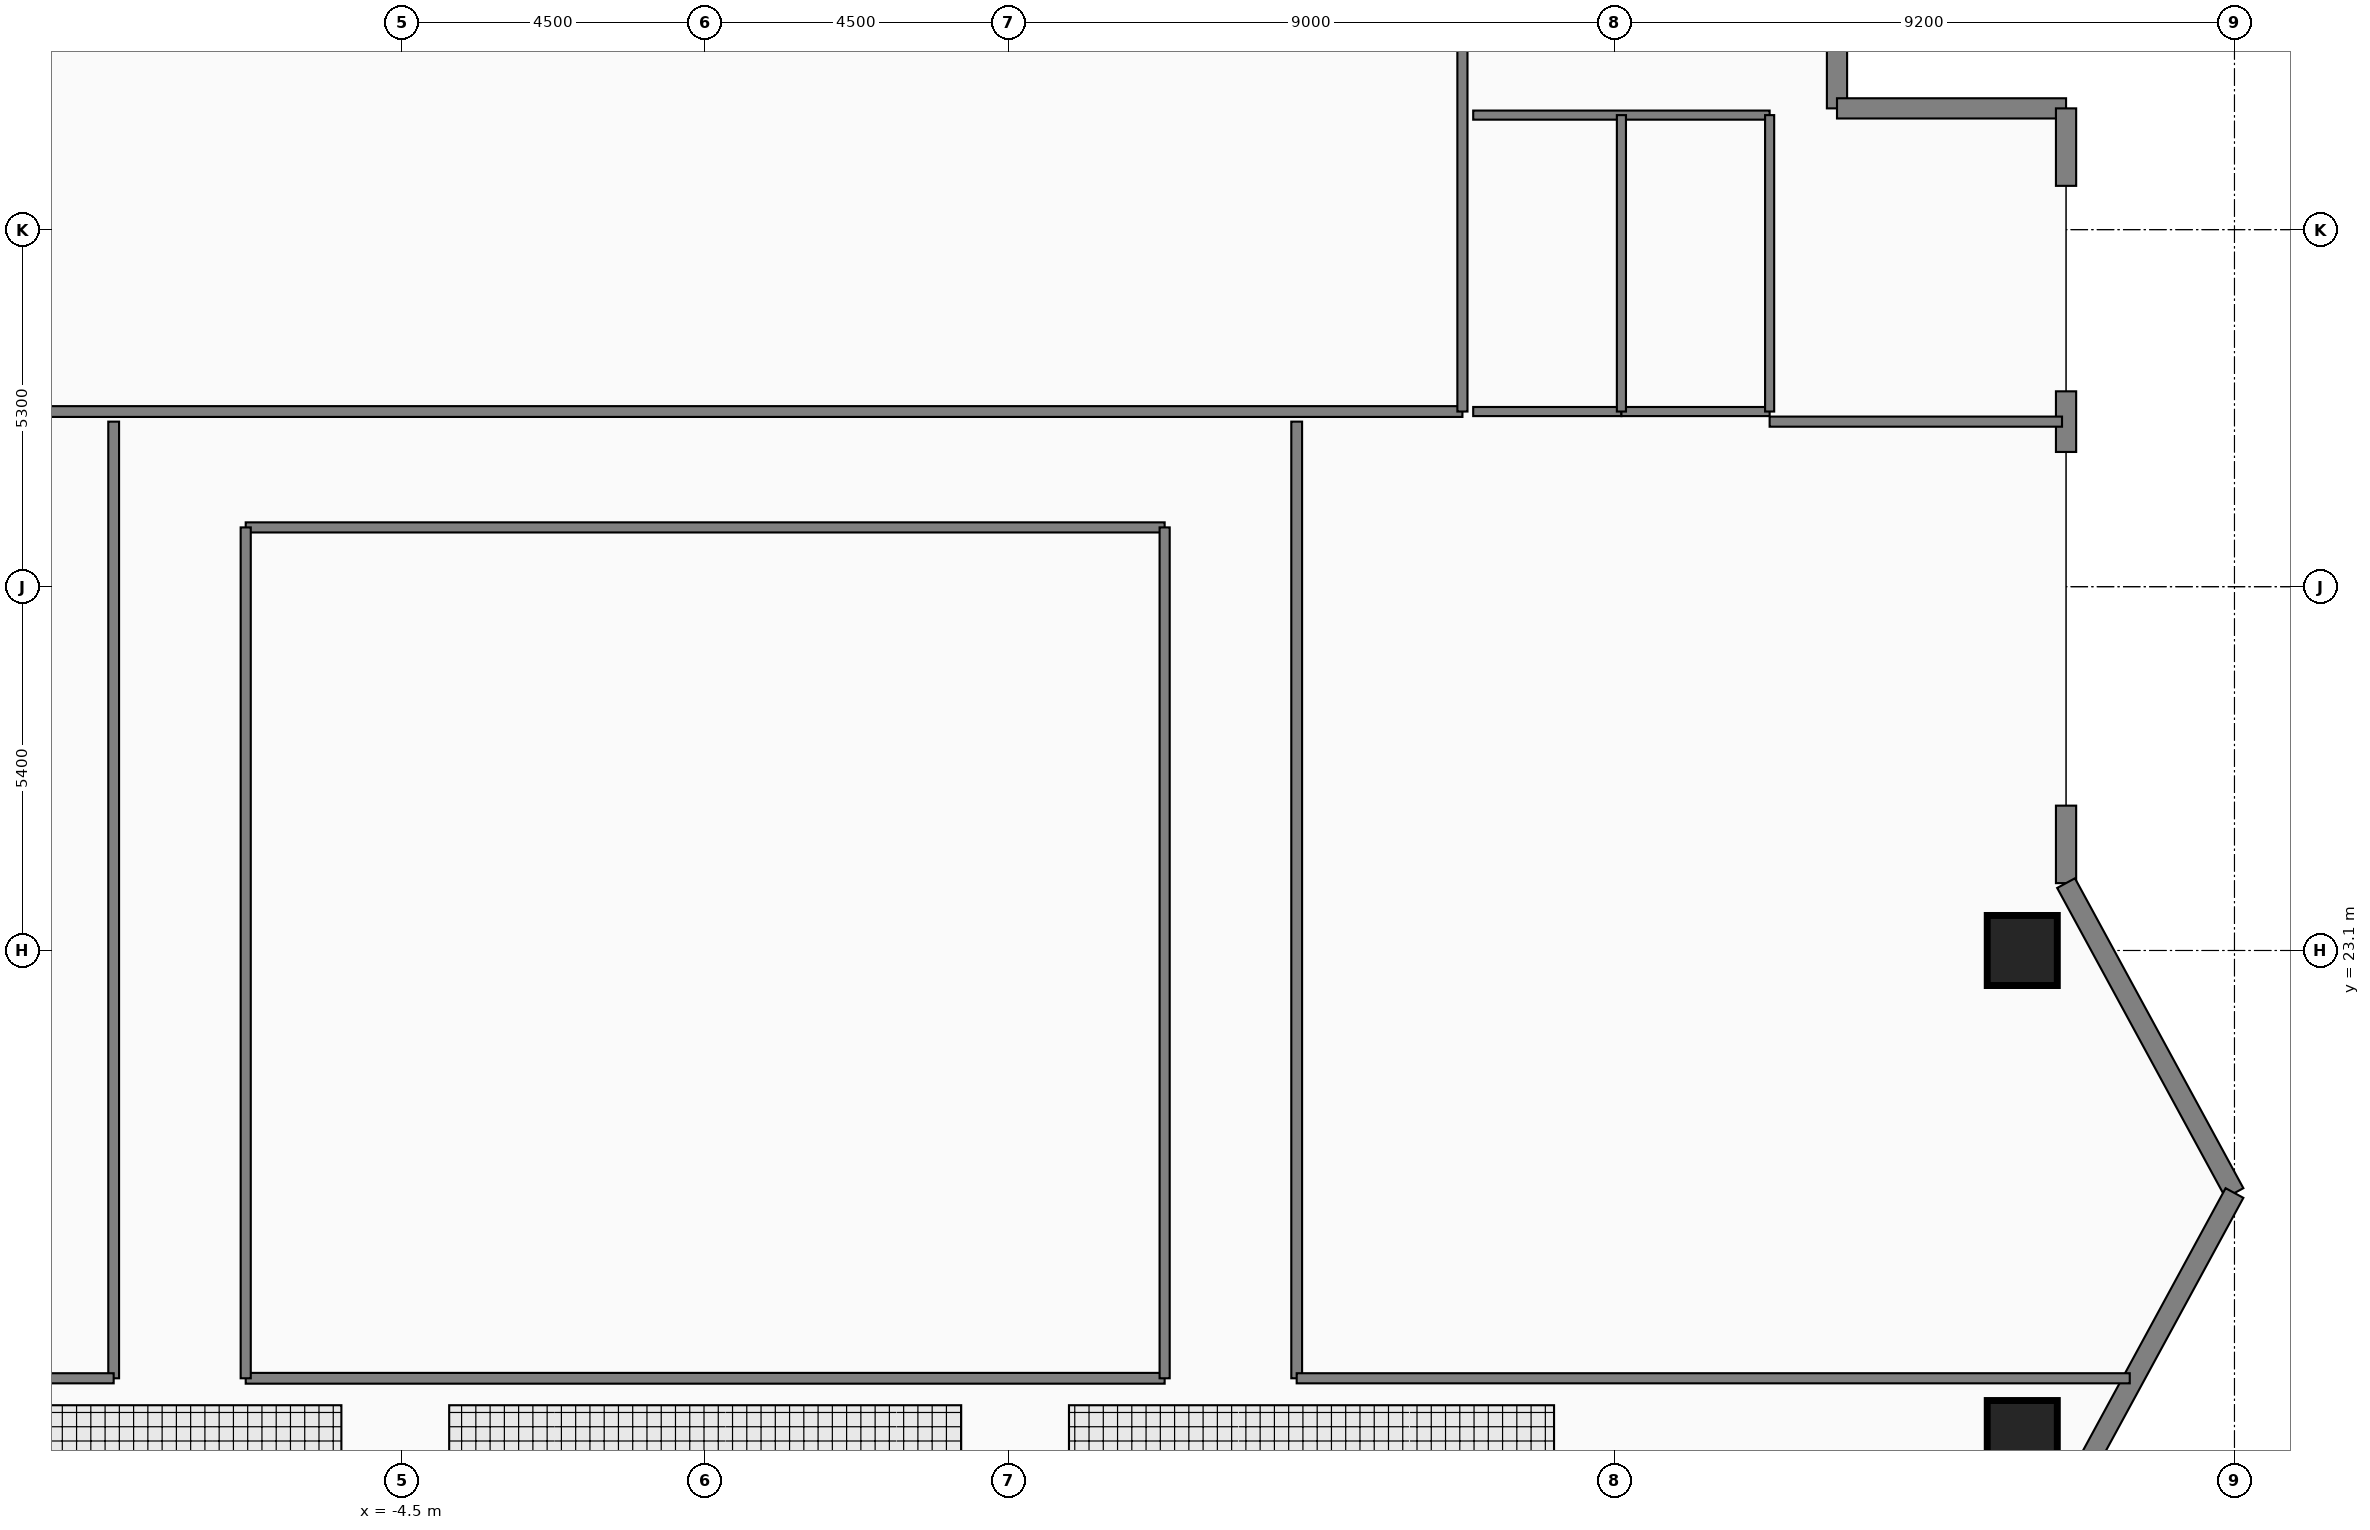
"""IFC4 building model, lengths in metres.
Left out: names, types, materials, properties, quantities, classifications, styles, units other than length and angle.
Written with IfcOpenShell. Run it as: python <this file> out.ifc"""

import sys

from ifc_helpers import new_model, si_unit, direction, frame, frame_2d, origin, origin_2d, place, context, subcontext, project, spatial, rectangle, extrude, element, fill, save


model = new_model("IFC4")
c1 = context("Model", 3, precision=1e-05, world=origin(), true_north=direction((0.0, 1.0)))
c2 = subcontext(c1, "Body", "Model", "MODEL_VIEW")
j1 = project(units=[si_unit("LENGTHUNIT", "METRE"), si_unit("PLANEANGLEUNIT", "RADIAN")], contexts=[c1])
p1 = place(None, origin())
s1 = spatial("IfcSite", under=j1, at=p1, CompositionType="ELEMENT")
p2 = place(p1, origin())
s2 = spatial("IfcBuilding", under=s1, at=p2, CompositionType="ELEMENT")
p3 = place(p2, frame((0.0, 0.0, 284.05)))
s3 = spatial("IfcBuildingStorey", under=s2, at=p3, CompositionType="ELEMENT", Elevation=284.05)
for number, where, z_axis, x_axis in (
    (1, (19.55, 15.9, 0.0), (0.0, 0.0, 1.0), (1.0, 0.0, 0.0)),
    (2, (19.55, 23.1, 0.0), (0.0, 0.0, 1.0), (1.0, 0.0, 0.0)),
):
    element("IfcColumn", number, at=place(p3, frame(where, z_axis=z_axis, x_axis=x_axis)), inside=s3, PredefinedType="COLUMN", context=c2, shape_type="SweptSolid", body=[
        extrude(rectangle(XDim=1.0, YDim=1.0, at=origin_2d()), origin(), (0.0, 0.0, 1.0), 4.4),
    ])
p4 = place(p3, frame((16.8, 39.0, 0.0), z_axis=(0.0, 0.0, 1.0), x_axis=(0.0, -1.0, 0.0)))
e3 = element("IfcWall", 3, at=p4, inside=s3, PredefinedType="STANDARD", context=c2, shape_type="SweptSolid", body=[
    extrude(rectangle(XDim=3.4, YDim=0.3, at=frame_2d((1.7, 0.0))), origin(), (0.0, 0.0, 1.0), 4.18),
])
p5 = place(p4, frame((1.125, 0.0, 1.25)))
e4 = element("IfcOpeningElement", 4, at=p5, cuts=e3, PredefinedType="OPENING", context=c2, shape_type="SweptSolid", body=[
    extrude(rectangle(XDim=1.15, YDim=1.55, at=frame_2d((0.575, 0.775))), frame((0.0, 0.16, 0.0), z_axis=(0.0, -1.0, 0.0), x_axis=(1.0, 0.0, 0.0)), (0.0, 0.0, 1.0), 0.32),
])
p6 = place(p3, frame((16.8, 35.6, 0.0), z_axis=(0.0, 0.0, 1.0), x_axis=(1.0, 0.0, 0.0)))
e5 = element("IfcWall", 5, at=p6, inside=s3, PredefinedType="STANDARD", context=c2, shape_type="SweptSolid", body=[
    extrude(rectangle(XDim=3.4, YDim=0.3, at=frame_2d((1.7, 0.0))), origin(), (0.0, 0.0, 1.0), 4.18),
])
p7 = place(p6, frame((1.125, 0.0, 1.25)))
e6 = element("IfcOpeningElement", 6, at=p7, cuts=e5, PredefinedType="OPENING", context=c2, shape_type="SweptSolid", body=[
    extrude(rectangle(XDim=1.15, YDim=1.55, at=frame_2d((0.575, 0.775))), frame((0.0, 0.16, 0.0), z_axis=(0.0, -1.0, 0.0), x_axis=(1.0, 0.0, 0.0)), (0.0, 0.0, 1.0), 0.32),
])
p8 = place(p3, frame((20.2, 35.6, 0.0), z_axis=(0.0, 0.0, 1.0), x_axis=(0.0, -1.0, 0.0)))
e7 = element("IfcWall", 7, at=p8, inside=s3, PredefinedType="STANDARD", context=c2, shape_type="SweptSolid", body=[
    extrude(rectangle(XDim=1.15, YDim=0.3, at=frame_2d((0.575, 0.0))), origin(), (0.0, 0.0, 1.0), 4.18),
])
p9 = place(p3, frame((20.2, 31.4, 0.0), z_axis=(0.0, 0.0, 1.0), x_axis=(0.0, -1.0, 0.0)))
e8 = element("IfcWall", 8, at=p9, inside=s3, PredefinedType="STANDARD", context=c2, shape_type="SweptSolid", body=[
    extrude(rectangle(XDim=0.9, YDim=0.3, at=frame_2d((0.45, 0.0))), origin(), (0.0, 0.0, 1.0), 4.18),
])
p10 = place(p3, frame((20.2, 25.25, 0.0), z_axis=(0.0, 0.0, 1.0), x_axis=(0.0, -1.0, 0.0)))
e9 = element("IfcWall", 9, at=p10, inside=s3, PredefinedType="STANDARD", context=c2, shape_type="SweptSolid", body=[
    extrude(rectangle(XDim=1.15, YDim=0.3, at=frame_2d((0.575, 0.0))), origin(), (0.0, 0.0, 1.0), 4.18),
])
p11 = place(p3, frame((20.2, 24.1, 0.0), z_axis=(0.0, 0.0, 1.0), x_axis=(0.477505494629, -0.878628762675, 0.0)))
e10 = element("IfcWall", 10, at=p11, inside=s3, PredefinedType="STANDARD", context=c2, shape_type="SweptSolid", body=[
    extrude(rectangle(XDim=5.236, YDim=0.3, at=frame_2d((2.618, 0.0))), origin(), (0.0, 0.0, 1.0), 4.18),
])
p12 = place(p11, frame((2.043, 0.0, 1.25)))
e11 = element("IfcOpeningElement", 11, at=p12, cuts=e10, PredefinedType="OPENING", context=c2, shape_type="SweptSolid", body=[
    extrude(rectangle(XDim=1.15, YDim=1.55, at=frame_2d((0.575, 0.775))), frame((0.0, 0.16, 0.0), z_axis=(0.0, -1.0, 0.0), x_axis=(1.0, 0.0, 0.0)), (0.0, 0.0, 1.0), 0.32),
])
p13 = place(p3, frame((22.7, 19.5, 0.0), z_axis=(0.0, 0.0, 1.0), x_axis=(-0.477505494629, -0.878628762675, 0.0)))
e12 = element("IfcWall", 12, at=p13, inside=s3, PredefinedType="STANDARD", context=c2, shape_type="SweptSolid", body=[
    extrude(rectangle(XDim=5.236, YDim=0.3, at=frame_2d((2.618, 0.0))), origin(), (0.0, 0.0, 1.0), 4.18),
])
p14 = place(p13, frame((0.994, 0.0, 1.25)))
e13 = element("IfcOpeningElement", 13, at=p14, cuts=e12, PredefinedType="OPENING", context=c2, shape_type="SweptSolid", body=[
    extrude(rectangle(XDim=1.15, YDim=1.55, at=frame_2d((0.575, 0.775))), frame((0.0, 0.16, 0.0), z_axis=(0.0, -1.0, 0.0), x_axis=(1.0, 0.0, 0.0)), (0.0, 0.0, 1.0), 0.32),
])
p15 = place(p3, frame((-20.14, 31.1, 0.0), z_axis=(0.0, 0.0, 1.0), x_axis=(1.0, 0.0, 0.0)))
e14 = element("IfcWall", 14, at=p15, inside=s3, PredefinedType="PARTITIONING", context=c2, shape_type="SweptSolid", body=[
    extrude(rectangle(XDim=31.38, YDim=0.16, at=frame_2d((15.69, 0.0))), origin(), (0.0, 0.0, 1.0), 4.18),
])
p16 = place(p15, frame((17.35, 0.0, 0.0)))
e15 = element("IfcOpeningElement", 15, at=p16, cuts=e14, PredefinedType="OPENING", context=c2, shape_type="SweptSolid", body=[
    extrude(rectangle(XDim=1.08, YDim=2.18, at=frame_2d((0.54, 1.09))), frame((0.0, 0.09, 0.0), z_axis=(0.0, -1.0, 0.0), x_axis=(1.0, 0.0, 0.0)), (0.0, 0.0, 1.0), 0.18),
])
p17 = place(p3, frame((-6.82, 16.75, 0.0), z_axis=(0.0, 0.0, 1.0), x_axis=(1.0, 0.0, 0.0)))
e16 = element("IfcWall", 16, at=p17, inside=s3, PredefinedType="PARTITIONING", context=c2, shape_type="SweptSolid", body=[
    extrude(rectangle(XDim=13.64, YDim=0.16, at=frame_2d((6.82, 0.0))), origin(), (0.0, 0.0, 1.0), 3.776),
])
p18 = place(p17, frame((8.63, 0.0, 0.0)))
e17 = element("IfcOpeningElement", 17, at=p18, cuts=e16, PredefinedType="OPENING", context=c2, shape_type="SweptSolid", body=[
    extrude(rectangle(XDim=1.08, YDim=2.18, at=frame_2d((0.54, 1.09))), frame((0.0, 0.09, 0.0), z_axis=(0.0, -1.0, 0.0), x_axis=(1.0, 0.0, 0.0)), (0.0, 0.0, 1.0), 0.18),
])
p19 = place(p3, frame((-8.78, 16.75, 0.0), z_axis=(0.0, 0.0, 1.0), x_axis=(0.0, 1.0, 0.0)))
e18 = element("IfcWall", 18, at=p19, inside=s3, PredefinedType="PARTITIONING", context=c2, shape_type="SweptSolid", body=[
    extrude(rectangle(XDim=14.2, YDim=0.16, at=frame_2d((7.1, 0.0))), origin(), (0.0, 0.0, 1.0), 4.18),
])
p20 = place(p19, frame((6.56, 0.0, 0.0)))
e19 = element("IfcOpeningElement", 19, at=p20, cuts=e18, PredefinedType="OPENING", context=c2, shape_type="SweptSolid", body=[
    extrude(rectangle(XDim=1.08, YDim=2.18, at=frame_2d((0.54, 1.09))), frame((0.0, 0.09, 0.0), z_axis=(0.0, -1.0, 0.0), x_axis=(1.0, 0.0, 0.0)), (0.0, 0.0, 1.0), 0.18),
])
p21 = place(p3, frame((8.78, 16.75, 0.0), z_axis=(0.0, 0.0, 1.0), x_axis=(0.0, 1.0, 0.0)))
e20 = element("IfcWall", 20, at=p21, inside=s3, PredefinedType="PARTITIONING", context=c2, shape_type="SweptSolid", body=[
    extrude(rectangle(XDim=14.2, YDim=0.16, at=frame_2d((7.1, 0.0))), origin(), (0.0, 0.0, 1.0), 4.18),
])
p22 = place(p21, frame((6.56, 0.0, 0.0)))
e21 = element("IfcOpeningElement", 21, at=p22, cuts=e20, PredefinedType="OPENING", context=c2, shape_type="SweptSolid", body=[
    extrude(rectangle(XDim=1.08, YDim=2.18, at=frame_2d((0.54, 1.09))), frame((0.0, 0.09, 0.0), z_axis=(0.0, -1.0, 0.0), x_axis=(1.0, 0.0, 0.0)), (0.0, 0.0, 1.0), 0.18),
])
p23 = place(p3, frame((11.4, 31.1, 0.0), z_axis=(0.0, 0.0, 1.0), x_axis=(1.0, 0.0, 0.0)))
e22 = element("IfcWall", 22, at=p23, inside=s3, PredefinedType="PLUMBINGWALL", context=c2, shape_type="SweptSolid", body=[
    extrude(rectangle(XDim=2.2, YDim=0.135, at=frame_2d((1.1, 0.0))), origin(), (0.0, 0.0, 1.0), 4.18),
])
p24 = place(p23, frame((0.64, 0.0, 0.0)))
e23 = element("IfcOpeningElement", 23, at=p24, cuts=e22, PredefinedType="OPENING", context=c2, shape_type="SweptSolid", body=[
    extrude(rectangle(XDim=0.92, YDim=2.12, at=frame_2d((0.46, 1.06))), frame((0.0, 0.077, 0.0), z_axis=(0.0, -1.0, 0.0), x_axis=(1.0, 0.0, 0.0)), (0.0, 0.0, 1.0), 0.155),
])
p25 = place(p3, frame((13.6, 31.1, 0.0), z_axis=(0.0, 0.0, 1.0), x_axis=(1.0, 0.0, 0.0)))
e24 = element("IfcWall", 24, at=p25, inside=s3, PredefinedType="PLUMBINGWALL", context=c2, shape_type="SweptSolid", body=[
    extrude(rectangle(XDim=2.2, YDim=0.135, at=frame_2d((1.1, 0.0))), origin(), (0.0, 0.0, 1.0), 4.18),
])
p26 = place(p25, frame((0.64, 0.0, 0.0)))
e25 = element("IfcOpeningElement", 25, at=p26, cuts=e24, PredefinedType="OPENING", context=c2, shape_type="SweptSolid", body=[
    extrude(rectangle(XDim=0.92, YDim=2.12, at=frame_2d((0.46, 1.06))), frame((0.0, 0.077, 0.0), z_axis=(0.0, -1.0, 0.0), x_axis=(1.0, 0.0, 0.0)), (0.0, 0.0, 1.0), 0.155),
])
p27 = place(p3, frame((11.24, 31.1, 0.0), z_axis=(0.0, 0.0, 1.0), x_axis=(0.0, 1.0, 0.0)))
e26 = element("IfcWall", 26, at=p27, inside=s3, PredefinedType="PARTITIONING", context=c2, shape_type="SweptSolid", body=[
    extrude(rectangle(XDim=7.84, YDim=0.15, at=frame_2d((3.92, 0.0))), origin(), (0.0, 0.0, 1.0), 4.18),
])
p28 = place(p3, frame((-6.82, 29.38, 0.0), z_axis=(0.0, 0.0, 1.0), x_axis=(1.0, 0.0, 0.0)))
e27 = element("IfcWall", 27, at=p28, inside=s3, PredefinedType="PARTITIONING", context=c2, shape_type="SweptSolid", body=[
    extrude(rectangle(XDim=13.64, YDim=0.15, at=frame_2d((6.82, 0.0))), origin(), (0.0, 0.0, 1.0), 4.18),
])
for number, where, z_axis, x_axis in (
    (28, (-6.82, 16.75, 0.0), (0.0, 0.0, 1.0), (0.0, 1.0, 0.0)),
    (29, (6.82, 16.75, 0.0), (0.0, 0.0, 1.0), (0.0, 1.0, 0.0)),
):
    element("IfcWall", number, at=place(p3, frame(where, z_axis=z_axis, x_axis=x_axis)), inside=s3, PredefinedType="PARTITIONING", context=c2, shape_type="SweptSolid", body=[
        extrude(rectangle(XDim=12.63, YDim=0.15, at=frame_2d((6.315, 0.0))), origin(), (0.0, 0.0, 1.0), 4.18),
    ])
for number, where, z_axis, x_axis in (
    (30, (-21.146, 16.75, 0.0), (0.0, 0.0, 1.0), (1.0, 0.0, 0.0)),
    (31, (8.78, 16.75, 0.0), (0.0, 0.0, 1.0), (1.0, 0.0, 0.0)),
):
    element("IfcWall", number, at=place(p3, frame(where, z_axis=z_axis, x_axis=x_axis)), inside=s3, PredefinedType="PARTITIONING", context=c2, shape_type="SweptSolid", body=[
        extrude(rectangle(XDim=12.365, YDim=0.15, at=frame_2d((6.183, 0.0))), origin(), (0.0, 0.0, 1.0), 3.776),
    ])
p29 = place(p3, frame((15.8, 30.95, 0.0), z_axis=(0.0, 0.0, 1.0), x_axis=(1.0, 0.0, 0.0)))
e32 = element("IfcWall", 32, at=p29, inside=s3, PredefinedType="PARTITIONING", context=c2, shape_type="SweptSolid", body=[
    extrude(rectangle(XDim=4.34, YDim=0.15, at=frame_2d((2.17, 0.0))), origin(), (0.0, 0.0, 1.0), 4.18),
])
p30 = place(p3, frame((11.4, 35.5, 0.0), z_axis=(0.0, 0.0, 1.0), x_axis=(1.0, 0.0, 0.0)))
e33 = element("IfcWall", 33, at=p30, inside=s3, PredefinedType="PLUMBINGWALL", context=c2, shape_type="SweptSolid", body=[
    extrude(rectangle(XDim=4.4, YDim=0.135, at=frame_2d((2.2, 0.0))), origin(), (0.0, 0.0, 1.0), 3.776),
])
p31 = place(p3, frame((15.8, 31.1, 0.0), z_axis=(0.0, 0.0, 1.0), x_axis=(0.0, 1.0, 0.0)))
e34 = element("IfcWall", 34, at=p31, inside=s3, PredefinedType="PLUMBINGWALL", context=c2, shape_type="SweptSolid", body=[
    extrude(rectangle(XDim=4.4, YDim=0.135, at=frame_2d((2.2, 0.0))), origin(), (0.0, 0.0, 1.0), 4.18),
])
p32 = place(p3, frame((13.6, 31.1, 0.0), z_axis=(0.0, 0.0, 1.0), x_axis=(0.0, 1.0, 0.0)))
e35 = element("IfcWall", 35, at=p32, inside=s3, PredefinedType="PLUMBINGWALL", context=c2, shape_type="SweptSolid", body=[
    extrude(rectangle(XDim=4.4, YDim=0.135, at=frame_2d((2.2, 0.0))), origin(), (0.0, 0.0, 1.0), 3.062),
])
p33 = place(p7, origin())
e36 = element("IfcWindow", 36, at=p33, inside=s3, PartitioningType="SINGLE_PANEL", PredefinedType="WINDOW", context=c2, shape_type="SweptSolid", body=[
    extrude(rectangle(XDim=1.15, YDim=1.55, at=frame_2d((0.575, 0.775))), frame((0.0, 0.03, 0.0), z_axis=(0.0, -1.0, 0.0), x_axis=(1.0, 0.0, 0.0)), (0.0, 0.0, 1.0), 0.06),
])
fill(e6, e36)
p34 = place(p12, origin())
e37 = element("IfcWindow", 37, at=p34, inside=s3, PartitioningType="SINGLE_PANEL", PredefinedType="WINDOW", context=c2, shape_type="SweptSolid", body=[
    extrude(rectangle(XDim=1.15, YDim=1.55, at=frame_2d((0.575, 0.775))), frame((0.0, 0.03, 0.0), z_axis=(0.0, -1.0, 0.0), x_axis=(1.0, 0.0, 0.0)), (0.0, 0.0, 1.0), 0.06),
])
fill(e11, e37)
p35 = place(p14, origin())
e38 = element("IfcWindow", 38, at=p35, inside=s3, PartitioningType="SINGLE_PANEL", PredefinedType="WINDOW", context=c2, shape_type="SweptSolid", body=[
    extrude(rectangle(XDim=1.15, YDim=1.55, at=frame_2d((0.575, 0.775))), frame((0.0, 0.03, 0.0), z_axis=(0.0, -1.0, 0.0), x_axis=(1.0, 0.0, 0.0)), (0.0, 0.0, 1.0), 0.06),
])
fill(e13, e38)
p36 = place(p16, origin())
e39 = element("IfcDoor", 39, at=p36, inside=s3, OperationType="SINGLE_SWING_RIGHT", PredefinedType="DOOR", context=c2, shape_type="SweptSolid", body=[
    extrude(rectangle(XDim=1.08, YDim=2.18, at=frame_2d((0.54, 1.09))), frame((0.0, 0.025, 0.0), z_axis=(0.0, -1.0, 0.0), x_axis=(1.0, 0.0, 0.0)), (0.0, 0.0, 1.0), 0.05),
])
fill(e15, e39)
p37 = place(p18, origin())
e40 = element("IfcDoor", 40, at=p37, inside=s3, OperationType="SINGLE_SWING_LEFT", PredefinedType="DOOR", context=c2, shape_type="SweptSolid", body=[
    extrude(rectangle(XDim=1.08, YDim=2.18, at=frame_2d((0.54, 1.09))), frame((0.0, 0.025, 0.0), z_axis=(0.0, -1.0, 0.0), x_axis=(1.0, 0.0, 0.0)), (0.0, 0.0, 1.0), 0.05),
])
fill(e17, e40)
p38 = place(p20, origin())
e41 = element("IfcDoor", 41, at=p38, inside=s3, OperationType="SINGLE_SWING_RIGHT", PredefinedType="DOOR", context=c2, shape_type="SweptSolid", body=[
    extrude(rectangle(XDim=1.08, YDim=2.18, at=frame_2d((0.54, 1.09))), frame((0.0, 0.025, 0.0), z_axis=(0.0, -1.0, 0.0), x_axis=(1.0, 0.0, 0.0)), (0.0, 0.0, 1.0), 0.05),
])
fill(e19, e41)
p39 = place(p22, origin())
e42 = element("IfcDoor", 42, at=p39, inside=s3, OperationType="SINGLE_SWING_LEFT", PredefinedType="DOOR", context=c2, shape_type="SweptSolid", body=[
    extrude(rectangle(XDim=1.08, YDim=2.18, at=frame_2d((0.54, 1.09))), frame((0.0, 0.025, 0.0), z_axis=(0.0, -1.0, 0.0), x_axis=(1.0, 0.0, 0.0)), (0.0, 0.0, 1.0), 0.05),
])
fill(e21, e42)
p40 = place(p24, origin())
e43 = element("IfcDoor", 43, at=p40, inside=s3, OperationType="SINGLE_SWING_RIGHT", PredefinedType="DOOR", context=c2, shape_type="SweptSolid", body=[
    extrude(rectangle(XDim=0.92, YDim=2.12, at=frame_2d((0.46, 1.06))), frame((0.0, 0.025, 0.0), z_axis=(0.0, -1.0, 0.0), x_axis=(1.0, 0.0, 0.0)), (0.0, 0.0, 1.0), 0.05),
])
fill(e23, e43)
p41 = place(p26, origin())
e44 = element("IfcDoor", 44, at=p41, inside=s3, OperationType="SINGLE_SWING_LEFT", PredefinedType="DOOR", context=c2, shape_type="SweptSolid", body=[
    extrude(rectangle(XDim=0.92, YDim=2.12, at=frame_2d((0.46, 1.06))), frame((0.0, 0.025, 0.0), z_axis=(0.0, -1.0, 0.0), x_axis=(1.0, 0.0, 0.0)), (0.0, 0.0, 1.0), 0.05),
])
fill(e25, e44)
save(model, sys.argv[1])
